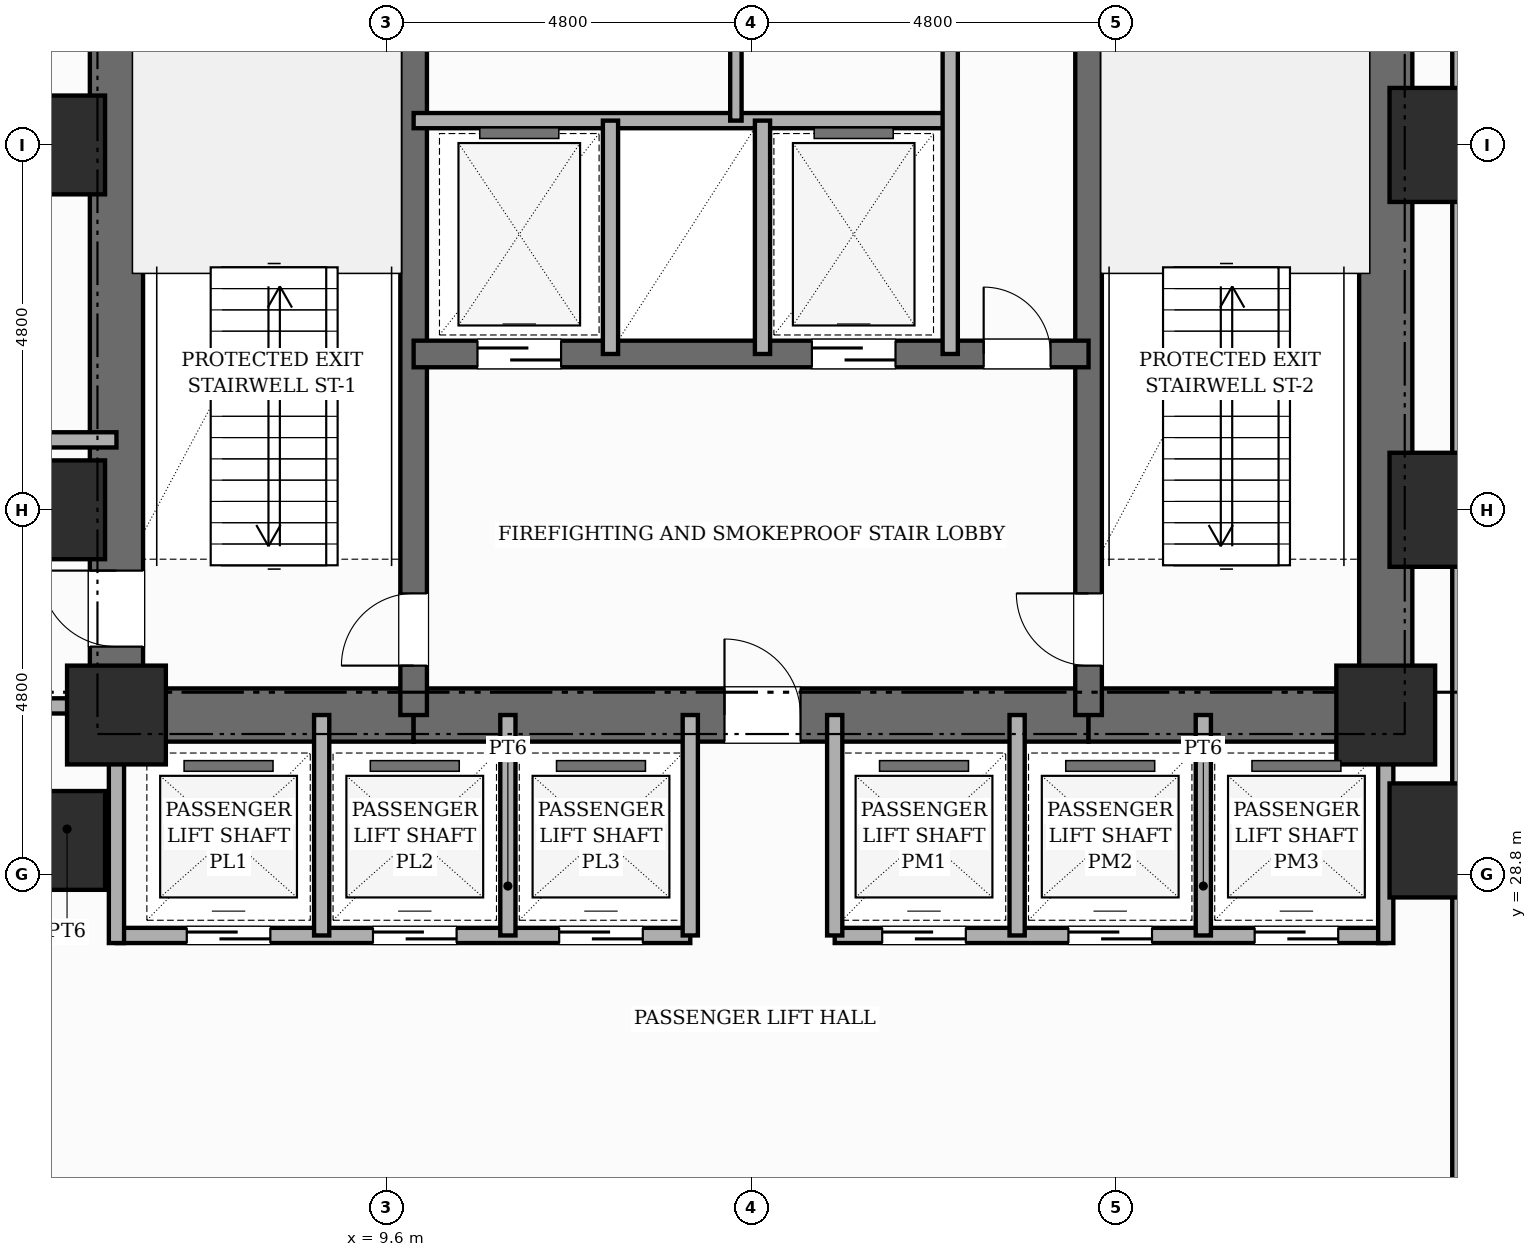
"""IFC4 building model, lengths in metres.
Left out: names, types, materials, properties, quantities, classifications, styles, units other than length and angle.
Written with IfcOpenShell. Run it as: python <this file> out.ifc"""

import sys

from ifc_helpers import new_model, si_unit, direction, frame, frame_2d, origin, origin_2d, place, context, subcontext, project, spatial, rectangle, extrude, element, fill, save


model = new_model("IFC4")
c1 = context("Model", 3, precision=1e-05, world=origin(), true_north=direction((0.0, 1.0)))
c2 = subcontext(c1, "Body", "Model", "MODEL_VIEW")
j1 = project(units=[si_unit("LENGTHUNIT", "METRE"), si_unit("PLANEANGLEUNIT", "RADIAN")], contexts=[c1])
p1 = place(None, origin())
s1 = spatial("IfcSite", under=j1, at=p1, CompositionType="ELEMENT")
p2 = place(p1, origin())
s2 = spatial("IfcBuilding", under=s1, at=p2, CompositionType="ELEMENT")
p3 = place(p2, origin())
s3 = spatial("IfcBuildingStorey", under=s2, at=p3, CompositionType="ELEMENT", Elevation=0.0)
p4 = place(p3, frame((6.05, 30.55, 0.0), z_axis=(0.0, 0.0, 1.0), x_axis=(0.0, 1.0, 0.0)))
e1 = element("IfcWall", 1, at=p4, inside=s3, PredefinedType="SHEAR", context=c2, shape_type="SweptSolid", body=[
    extrude(rectangle(XDim=15.6, YDim=0.7, at=frame_2d((7.8, 0.0))), origin(), (0.0, 0.0, 1.0), 5.2),
])
p5 = place(p4, frame((1.25, 0.0, 0.0)))
e2 = element("IfcOpeningElement", 2, at=p5, cuts=e1, PredefinedType="OPENING", context=c2, shape_type="SweptSolid", body=[
    extrude(rectangle(XDim=1.0, YDim=2.15, at=frame_2d((0.5, 1.075))), frame((0.0, 0.36, 0.0), z_axis=(0.0, -1.0, 0.0), x_axis=(1.0, 0.0, 0.0)), (0.0, 0.0, 1.0), 0.72),
])
p6 = place(p3, frame((22.75, 30.55, 0.0), z_axis=(0.0, 0.0, 1.0), x_axis=(0.0, 1.0, 0.0)))
e3 = element("IfcWall", 3, at=p6, inside=s3, PredefinedType="SHEAR", context=c2, shape_type="SweptSolid", body=[
    extrude(rectangle(XDim=15.6, YDim=0.7, at=frame_2d((7.8, 0.0))), origin(), (0.0, 0.0, 1.0), 5.2),
])
p7 = place(p6, frame((10.8, 0.0, 0.0)))
e4 = element("IfcOpeningElement", 4, at=p7, cuts=e3, PredefinedType="OPENING", context=c2, shape_type="SweptSolid", body=[
    extrude(rectangle(XDim=1.0, YDim=2.15, at=frame_2d((0.5, 1.075))), frame((0.0, 0.36, 0.0), z_axis=(0.0, -1.0, 0.0), x_axis=(1.0, 0.0, 0.0)), (0.0, 0.0, 1.0), 0.72),
])
p8 = place(p3, frame((6.05, 30.9, 0.0), z_axis=(0.0, 0.0, 1.0), x_axis=(1.0, 0.0, 0.0)))
e5 = element("IfcWall", 5, at=p8, inside=s3, PredefinedType="SHEAR", context=c2, shape_type="SweptSolid", body=[
    extrude(rectangle(XDim=3.91, YDim=0.7, at=frame_2d((1.955, 0.0))), origin(), (0.0, 0.0, 1.0), 5.2),
])
p9 = place(p3, frame((9.96, 30.9, 0.0), z_axis=(0.0, 0.0, 1.0), x_axis=(1.0, 0.0, 0.0)))
e6 = element("IfcWall", 6, at=p9, inside=s3, PredefinedType="SHEAR", context=c2, shape_type="SweptSolid", body=[
    extrude(rectangle(XDim=8.88, YDim=0.7, at=frame_2d((4.44, 0.0))), origin(), (0.0, 0.0, 1.0), 5.2),
])
p10 = place(p9, frame((4.09, 0.0, 0.0)))
e7 = element("IfcOpeningElement", 7, at=p10, cuts=e6, PredefinedType="OPENING", context=c2, shape_type="SweptSolid", body=[
    extrude(rectangle(XDim=1.0, YDim=2.15, at=frame_2d((0.5, 1.075))), frame((0.0, 0.36, 0.0), z_axis=(0.0, -1.0, 0.0), x_axis=(1.0, 0.0, 0.0)), (0.0, 0.0, 1.0), 0.72),
])
p11 = place(p3, frame((18.84, 30.9, 0.0), z_axis=(0.0, 0.0, 1.0), x_axis=(1.0, 0.0, 0.0)))
e8 = element("IfcWall", 8, at=p11, inside=s3, PredefinedType="SHEAR", context=c2, shape_type="SweptSolid", body=[
    extrude(rectangle(XDim=3.91, YDim=0.7, at=frame_2d((1.955, 0.0))), origin(), (0.0, 0.0, 1.0), 5.2),
])
p12 = place(p3, frame((9.96, 30.9, 0.0), z_axis=(0.0, 0.0, 1.0), x_axis=(0.0, 1.0, 0.0)))
e9 = element("IfcWall", 9, at=p12, inside=s3, PredefinedType="SHEAR", context=c2, shape_type="SweptSolid", body=[
    extrude(rectangle(XDim=14.9, YDim=0.35, at=frame_2d((7.45, 0.0))), origin(), (0.0, 0.0, 1.0), 5.2),
])
p13 = place(p12, frame((0.65, 0.0, 0.0)))
e10 = element("IfcOpeningElement", 10, at=p13, cuts=e9, PredefinedType="OPENING", context=c2, shape_type="SweptSolid", body=[
    extrude(rectangle(XDim=0.95, YDim=2.1, at=frame_2d((0.475, 1.05))), frame((0.0, 0.185, 0.0), z_axis=(0.0, -1.0, 0.0), x_axis=(1.0, 0.0, 0.0)), (0.0, 0.0, 1.0), 0.37),
])
p14 = place(p12, frame((10.45, 0.0, 0.0)))
e11 = element("IfcOpeningElement", 11, at=p14, cuts=e9, PredefinedType="OPENING", context=c2, shape_type="SweptSolid", body=[
    extrude(rectangle(XDim=1.0, YDim=2.15, at=frame_2d((0.5, 1.075))), frame((0.0, 0.185, 0.0), z_axis=(0.0, -1.0, 0.0), x_axis=(1.0, 0.0, 0.0)), (0.0, 0.0, 1.0), 0.37),
])
p15 = place(p3, frame((18.84, 30.9, 0.0), z_axis=(0.0, 0.0, 1.0), x_axis=(0.0, 1.0, 0.0)))
e12 = element("IfcWall", 12, at=p15, inside=s3, PredefinedType="SHEAR", context=c2, shape_type="SweptSolid", body=[
    extrude(rectangle(XDim=14.9, YDim=0.35, at=frame_2d((7.45, 0.0))), origin(), (0.0, 0.0, 1.0), 5.2),
])
p16 = place(p15, frame((0.65, 0.0, 0.0)))
e13 = element("IfcOpeningElement", 13, at=p16, cuts=e12, PredefinedType="OPENING", context=c2, shape_type="SweptSolid", body=[
    extrude(rectangle(XDim=0.95, YDim=2.1, at=frame_2d((0.475, 1.05))), frame((0.0, 0.185, 0.0), z_axis=(0.0, -1.0, 0.0), x_axis=(1.0, 0.0, 0.0)), (0.0, 0.0, 1.0), 0.37),
])
p17 = place(p15, frame((10.45, 0.0, 0.0)))
e14 = element("IfcOpeningElement", 14, at=p17, cuts=e12, PredefinedType="OPENING", context=c2, shape_type="SweptSolid", body=[
    extrude(rectangle(XDim=1.0, YDim=2.15, at=frame_2d((0.5, 1.075))), frame((0.0, 0.185, 0.0), z_axis=(0.0, -1.0, 0.0), x_axis=(1.0, 0.0, 0.0)), (0.0, 0.0, 1.0), 0.37),
])
p18 = place(p3, frame((9.96, 35.65, 0.0), z_axis=(0.0, 0.0, 1.0), x_axis=(1.0, 0.0, 0.0)))
e15 = element("IfcWall", 15, at=p18, inside=s3, PredefinedType="SHEAR", context=c2, shape_type="SweptSolid", body=[
    extrude(rectangle(XDim=8.88, YDim=0.35, at=frame_2d((4.44, 0.0))), origin(), (0.0, 0.0, 1.0), 5.2),
])
p19 = place(p18, frame((0.84, 0.0, 0.0)))
e16 = element("IfcOpeningElement", 16, at=p19, cuts=e15, PredefinedType="OPENING", context=c2, shape_type="SweptSolid", body=[
    extrude(rectangle(XDim=1.1, YDim=2.15, at=frame_2d((0.55, 1.075))), frame((0.0, 0.185, 0.0), z_axis=(0.0, -1.0, 0.0), x_axis=(1.0, 0.0, 0.0)), (0.0, 0.0, 1.0), 0.37),
])
p20 = place(p18, frame((5.24, 0.0, 0.0)))
e17 = element("IfcOpeningElement", 17, at=p20, cuts=e15, PredefinedType="OPENING", context=c2, shape_type="SweptSolid", body=[
    extrude(rectangle(XDim=1.1, YDim=2.15, at=frame_2d((0.55, 1.075))), frame((0.0, 0.185, 0.0), z_axis=(0.0, -1.0, 0.0), x_axis=(1.0, 0.0, 0.0)), (0.0, 0.0, 1.0), 0.37),
])
p21 = place(p18, frame((7.5, 0.0, 0.0)))
e18 = element("IfcOpeningElement", 18, at=p21, cuts=e15, PredefinedType="OPENING", context=c2, shape_type="SweptSolid", body=[
    extrude(rectangle(XDim=0.88, YDim=2.1, at=frame_2d((0.44, 1.05))), frame((0.0, 0.185, 0.0), z_axis=(0.0, -1.0, 0.0), x_axis=(1.0, 0.0, 0.0)), (0.0, 0.0, 1.0), 0.37),
])
for number, where, z_axis, x_axis in (
    (19, (5.25, 29.25, 0.0), (0.0, 0.0, 1.0), (1.0, 0.0, 0.0)),
    (20, (5.25, 33.6, 0.0), (0.0, 0.0, 1.0), (1.0, 0.0, 0.0)),
    (21, (5.25, 38.4, 0.0), (0.0, 0.0, 1.0), (1.0, 0.0, 0.0)),
    (22, (6.05, 30.9, 0.0), (0.0, 0.0, 1.0), (1.0, 0.0, 0.0)),
    (23, (22.75, 30.9, 0.0), (0.0, 0.0, 1.0), (1.0, 0.0, 0.0)),
):
    element("IfcColumn", number, at=place(p3, frame(where, z_axis=z_axis, x_axis=x_axis)), inside=s3, PredefinedType="COLUMN", context=c2, shape_type="SweptSolid", body=[
        extrude(rectangle(XDim=1.3, YDim=1.3, at=origin_2d()), origin(), (0.0, 0.0, 1.0), 5.2),
    ])
for number, where, z_axis, x_axis in (
    (24, (23.55, 29.25, 0.0), (0.0, 0.0, 1.0), (1.0, 0.0, 0.0)),
    (25, (23.55, 33.6, 0.0), (0.0, 0.0, 1.0), (1.0, 0.0, 0.0)),
    (26, (23.55, 38.4, 0.0), (0.0, 0.0, 1.0), (1.0, 0.0, 0.0)),
):
    element("IfcColumn", number, at=place(p3, frame(where, z_axis=z_axis, x_axis=x_axis)), inside=s3, PredefinedType="USERDEFINED", context=c2, shape_type="SweptSolid", body=[
        extrude(rectangle(XDim=1.5, YDim=1.5, at=origin_2d()), origin(), (0.0, 0.0, 1.0), 5.2),
    ])
p22 = place(p3, frame((23.825, 48.0, 0.0), z_axis=(0.0, 0.0, 1.0), x_axis=(0.0, -1.0, 0.0)))
e27 = element("IfcWall", 27, at=p22, inside=s3, PredefinedType="SOLIDWALL", context=c2, shape_type="SweptSolid", body=[
    extrude(rectangle(XDim=30.24, YDim=0.4, at=frame_2d((15.12, 0.0))), origin(), (0.0, 0.0, 1.0), 3.97),
])
p23 = place(p22, frame((25.45, 0.0, 0.85)))
e28 = element("IfcOpeningElement", 28, at=p23, cuts=e27, PredefinedType="OPENING", context=c2, shape_type="SweptSolid", body=[
    extrude(rectangle(XDim=1.9, YDim=2.6, at=frame_2d((0.95, 1.3))), frame((0.0, 0.21, 0.0), z_axis=(0.0, -1.0, 0.0), x_axis=(1.0, 0.0, 0.0)), (0.0, 0.0, 1.0), 0.42),
])
p24 = place(p3, frame((9.96, 38.72, 0.0), z_axis=(0.0, 0.0, 1.0), x_axis=(1.0, 0.0, 0.0)))
e29 = element("IfcWall", 29, at=p24, inside=s3, PredefinedType="POLYGONAL", context=c2, shape_type="SweptSolid", body=[
    extrude(rectangle(XDim=7.06, YDim=0.2, at=frame_2d((3.53, 0.0))), origin(), (0.0, 0.0, 1.0), 4.89),
])
for number, where, z_axis, x_axis in (
    (30, (12.55, 35.65, 0.0), (0.0, 0.0, 1.0), (0.0, 1.0, 0.0)),
    (31, (14.55, 35.65, 0.0), (0.0, 0.0, 1.0), (0.0, 1.0, 0.0)),
):
    element("IfcWall", number, at=place(p3, frame(where, z_axis=z_axis, x_axis=x_axis)), inside=s3, PredefinedType="POLYGONAL", context=c2, shape_type="SweptSolid", body=[
        extrude(rectangle(XDim=3.07, YDim=0.2, at=frame_2d((1.535, 0.0))), origin(), (0.0, 0.0, 1.0), 4.89),
    ])
p25 = place(p3, frame((17.02, 35.65, 0.0), z_axis=(0.0, 0.0, 1.0), x_axis=(0.0, 1.0, 0.0)))
e32 = element("IfcWall", 32, at=p25, inside=s3, PredefinedType="POLYGONAL", context=c2, shape_type="SweptSolid", body=[
    extrude(rectangle(XDim=5.15, YDim=0.2, at=frame_2d((2.575, 0.0))), origin(), (0.0, 0.0, 1.0), 4.89),
])
p26 = place(p3, frame((14.2, 38.72, 0.0), z_axis=(0.0, 0.0, 1.0), x_axis=(0.0, 1.0, 0.0)))
e33 = element("IfcWall", 33, at=p26, inside=s3, PredefinedType="PARTITIONING", context=c2, shape_type="SweptSolid", body=[
    extrude(rectangle(XDim=2.08, YDim=0.15, at=frame_2d((1.04, 0.0))), origin(), (0.0, 0.0, 1.0), 4.89),
])
p27 = place(p3, frame((6.05, 28.0, 0.0), z_axis=(0.0, 0.0, 1.0), x_axis=(1.0, 0.0, 0.0)))
e34 = element("IfcWall", 34, at=p27, inside=s3, PredefinedType="POLYGONAL", context=c2, shape_type="SweptSolid", body=[
    extrude(rectangle(XDim=7.55, YDim=0.2, at=frame_2d((3.775, 0.0))), origin(), (0.0, 0.0, 1.0), 4.89),
])
p28 = place(p27, frame((0.925, 0.0, 0.0)))
e35 = element("IfcOpeningElement", 35, at=p28, cuts=e34, PredefinedType="OPENING", context=c2, shape_type="SweptSolid", body=[
    extrude(rectangle(XDim=1.1, YDim=2.15, at=frame_2d((0.55, 1.075))), frame((0.0, 0.11, 0.0), z_axis=(0.0, -1.0, 0.0), x_axis=(1.0, 0.0, 0.0)), (0.0, 0.0, 1.0), 0.22),
])
p29 = place(p27, frame((3.375, 0.0, 0.0)))
e36 = element("IfcOpeningElement", 36, at=p29, cuts=e34, PredefinedType="OPENING", context=c2, shape_type="SweptSolid", body=[
    extrude(rectangle(XDim=1.1, YDim=2.15, at=frame_2d((0.55, 1.075))), frame((0.0, 0.11, 0.0), z_axis=(0.0, -1.0, 0.0), x_axis=(1.0, 0.0, 0.0)), (0.0, 0.0, 1.0), 0.22),
])
p30 = place(p27, frame((5.825, 0.0, 0.0)))
e37 = element("IfcOpeningElement", 37, at=p30, cuts=e34, PredefinedType="OPENING", context=c2, shape_type="SweptSolid", body=[
    extrude(rectangle(XDim=1.1, YDim=2.15, at=frame_2d((0.55, 1.075))), frame((0.0, 0.11, 0.0), z_axis=(0.0, -1.0, 0.0), x_axis=(1.0, 0.0, 0.0)), (0.0, 0.0, 1.0), 0.22),
])
p31 = place(p3, frame((15.5, 28.0, 0.0), z_axis=(0.0, 0.0, 1.0), x_axis=(1.0, 0.0, 0.0)))
e38 = element("IfcWall", 38, at=p31, inside=s3, PredefinedType="POLYGONAL", context=c2, shape_type="SweptSolid", body=[
    extrude(rectangle(XDim=7.25, YDim=0.2, at=frame_2d((3.625, 0.0))), origin(), (0.0, 0.0, 1.0), 4.89),
])
p32 = place(p31, frame((0.625, 0.0, 0.0)))
e39 = element("IfcOpeningElement", 39, at=p32, cuts=e38, PredefinedType="OPENING", context=c2, shape_type="SweptSolid", body=[
    extrude(rectangle(XDim=1.1, YDim=2.15, at=frame_2d((0.55, 1.075))), frame((0.0, 0.11, 0.0), z_axis=(0.0, -1.0, 0.0), x_axis=(1.0, 0.0, 0.0)), (0.0, 0.0, 1.0), 0.22),
])
p33 = place(p31, frame((3.075, 0.0, 0.0)))
e40 = element("IfcOpeningElement", 40, at=p33, cuts=e38, PredefinedType="OPENING", context=c2, shape_type="SweptSolid", body=[
    extrude(rectangle(XDim=1.1, YDim=2.15, at=frame_2d((0.55, 1.075))), frame((0.0, 0.11, 0.0), z_axis=(0.0, -1.0, 0.0), x_axis=(1.0, 0.0, 0.0)), (0.0, 0.0, 1.0), 0.22),
])
p34 = place(p31, frame((5.525, 0.0, 0.0)))
e41 = element("IfcOpeningElement", 41, at=p34, cuts=e38, PredefinedType="OPENING", context=c2, shape_type="SweptSolid", body=[
    extrude(rectangle(XDim=1.1, YDim=2.15, at=frame_2d((0.55, 1.075))), frame((0.0, 0.11, 0.0), z_axis=(0.0, -1.0, 0.0), x_axis=(1.0, 0.0, 0.0)), (0.0, 0.0, 1.0), 0.22),
])
for number, where, z_axis, x_axis in (
    (42, (6.05, 27.9, 0.0), (0.0, 0.0, 1.0), (0.0, 1.0, 0.0)),
    (43, (22.75, 27.9, 0.0), (0.0, 0.0, 1.0), (0.0, 1.0, 0.0)),
):
    element("IfcWall", number, at=place(p3, frame(where, z_axis=z_axis, x_axis=x_axis)), inside=s3, PredefinedType="POLYGONAL", context=c2, shape_type="SweptSolid", body=[
        extrude(rectangle(XDim=3.0, YDim=0.2, at=frame_2d((1.5, 0.0))), origin(), (0.0, 0.0, 1.0), 4.89),
    ])
for number, where, z_axis, x_axis in (
    (44, (13.6, 28.0, 0.0), (0.0, 0.0, 1.0), (0.0, 1.0, 0.0)),
    (45, (15.5, 28.0, 0.0), (0.0, 0.0, 1.0), (0.0, 1.0, 0.0)),
    (46, (8.75, 28.0, 0.0), (0.0, 0.0, 1.0), (0.0, 1.0, 0.0)),
    (47, (11.2, 28.0, 0.0), (0.0, 0.0, 1.0), (0.0, 1.0, 0.0)),
    (48, (17.9, 28.0, 0.0), (0.0, 0.0, 1.0), (0.0, 1.0, 0.0)),
    (49, (20.35, 28.0, 0.0), (0.0, 0.0, 1.0), (0.0, 1.0, 0.0)),
):
    element("IfcWall", number, at=place(p3, frame(where, z_axis=z_axis, x_axis=x_axis)), inside=s3, PredefinedType="POLYGONAL", context=c2, shape_type="SweptSolid", body=[
        extrude(rectangle(XDim=2.9, YDim=0.2, at=frame_2d((1.45, 0.0))), origin(), (0.0, 0.0, 1.0), 4.89),
    ])
p35 = place(p3, frame((0.36, 34.52, 0.0), z_axis=(0.0, 0.0, 1.0), x_axis=(1.0, 0.0, 0.0)))
e50 = element("IfcWall", 50, at=p35, inside=s3, PredefinedType="PARTITIONING", context=c2, shape_type="SweptSolid", body=[
    extrude(rectangle(XDim=5.69, YDim=0.2, at=frame_2d((2.845, 0.0))), origin(), (0.0, 0.0, 1.0), 4.89),
])
p36 = place(p35, frame((2.02, 0.0, 0.0)))
e51 = element("IfcOpeningElement", 51, at=p36, cuts=e50, PredefinedType="OPENING", context=c2, shape_type="SweptSolid", body=[
    extrude(rectangle(XDim=0.98, YDim=2.18, at=frame_2d((0.49, 1.09))), frame((0.0, 0.11, 0.0), z_axis=(0.0, -1.0, 0.0), x_axis=(1.0, 0.0, 0.0)), (0.0, 0.0, 1.0), 0.22),
])
p37 = place(p3, frame((0.36, 31.02, 0.0), z_axis=(0.0, 0.0, 1.0), x_axis=(1.0, 0.0, 0.0)))
e52 = element("IfcWall", 52, at=p37, inside=s3, PredefinedType="PARTITIONING", context=c2, shape_type="SweptSolid", body=[
    extrude(rectangle(XDim=5.69, YDim=0.2, at=frame_2d((2.845, 0.0))), origin(), (0.0, 0.0, 1.0), 4.89),
])
p38 = place(p13, origin())
e53 = element("IfcDoor", 53, at=p38, inside=s3, OperationType="SINGLE_SWING_LEFT", PredefinedType="DOOR", context=c2, shape_type="SweptSolid", body=[
    extrude(rectangle(XDim=0.95, YDim=2.1, at=frame_2d((0.475, 1.05))), frame((0.0, 0.025, 0.0), z_axis=(0.0, -1.0, 0.0), x_axis=(1.0, 0.0, 0.0)), (0.0, 0.0, 1.0), 0.05),
])
fill(e10, e53)
p39 = place(p16, origin())
e54 = element("IfcDoor", 54, at=p39, inside=s3, OperationType="SINGLE_SWING_RIGHT", PredefinedType="DOOR", context=c2, shape_type="SweptSolid", body=[
    extrude(rectangle(XDim=0.95, YDim=2.1, at=frame_2d((0.475, 1.05))), frame((0.0, 0.025, 0.0), z_axis=(0.0, -1.0, 0.0), x_axis=(1.0, 0.0, 0.0)), (0.0, 0.0, 1.0), 0.05),
])
fill(e13, e54)
p40 = place(p5, origin())
e55 = element("IfcDoor", 55, at=p40, inside=s3, OperationType="SINGLE_SWING_RIGHT", PredefinedType="DOOR", context=c2, shape_type="SweptSolid", body=[
    extrude(rectangle(XDim=1.0, YDim=2.15, at=frame_2d((0.5, 1.075))), frame((0.0, 0.025, 0.0), z_axis=(0.0, -1.0, 0.0), x_axis=(1.0, 0.0, 0.0)), (0.0, 0.0, 1.0), 0.05),
])
fill(e2, e55)
p41 = place(p10, origin())
e56 = element("IfcDoor", 56, at=p41, inside=s3, OperationType="SINGLE_SWING_LEFT", PredefinedType="DOOR", context=c2, shape_type="SweptSolid", body=[
    extrude(rectangle(XDim=1.0, YDim=2.15, at=frame_2d((0.5, 1.075))), frame((0.0, 0.025, 0.0), z_axis=(0.0, -1.0, 0.0), x_axis=(1.0, 0.0, 0.0)), (0.0, 0.0, 1.0), 0.05),
])
fill(e7, e56)
p42 = place(p19, origin())
e57 = element("IfcDoor", 57, at=p42, inside=s3, OperationType="SLIDING_TO_LEFT", PredefinedType="DOOR", context=c2, shape_type="SweptSolid", body=[
    extrude(rectangle(XDim=1.1, YDim=2.15, at=frame_2d((0.55, 1.075))), frame((0.0, 0.025, 0.0), z_axis=(0.0, -1.0, 0.0), x_axis=(1.0, 0.0, 0.0)), (0.0, 0.0, 1.0), 0.05),
])
fill(e16, e57)
p43 = place(p20, origin())
e58 = element("IfcDoor", 58, at=p43, inside=s3, OperationType="SLIDING_TO_RIGHT", PredefinedType="DOOR", context=c2, shape_type="SweptSolid", body=[
    extrude(rectangle(XDim=1.1, YDim=2.15, at=frame_2d((0.55, 1.075))), frame((0.0, 0.025, 0.0), z_axis=(0.0, -1.0, 0.0), x_axis=(1.0, 0.0, 0.0)), (0.0, 0.0, 1.0), 0.05),
])
fill(e17, e58)
p44 = place(p21, origin())
e59 = element("IfcDoor", 59, at=p44, inside=s3, OperationType="SINGLE_SWING_LEFT", PredefinedType="DOOR", context=c2, shape_type="SweptSolid", body=[
    extrude(rectangle(XDim=0.88, YDim=2.1, at=frame_2d((0.44, 1.05))), frame((0.0, 0.025, 0.0), z_axis=(0.0, -1.0, 0.0), x_axis=(1.0, 0.0, 0.0)), (0.0, 0.0, 1.0), 0.05),
])
fill(e18, e59)
p45 = place(p28, origin())
e60 = element("IfcDoor", 60, at=p45, inside=s3, OperationType="SLIDING_TO_LEFT", PredefinedType="DOOR", context=c2, shape_type="SweptSolid", body=[
    extrude(rectangle(XDim=1.1, YDim=2.15, at=frame_2d((0.55, 1.075))), frame((0.0, 0.025, 0.0), z_axis=(0.0, -1.0, 0.0), x_axis=(1.0, 0.0, 0.0)), (0.0, 0.0, 1.0), 0.05),
])
fill(e35, e60)
p46 = place(p29, origin())
e61 = element("IfcDoor", 61, at=p46, inside=s3, OperationType="SLIDING_TO_RIGHT", PredefinedType="DOOR", context=c2, shape_type="SweptSolid", body=[
    extrude(rectangle(XDim=1.1, YDim=2.15, at=frame_2d((0.55, 1.075))), frame((0.0, 0.025, 0.0), z_axis=(0.0, -1.0, 0.0), x_axis=(1.0, 0.0, 0.0)), (0.0, 0.0, 1.0), 0.05),
])
fill(e36, e61)
p47 = place(p30, origin())
e62 = element("IfcDoor", 62, at=p47, inside=s3, OperationType="SLIDING_TO_LEFT", PredefinedType="DOOR", context=c2, shape_type="SweptSolid", body=[
    extrude(rectangle(XDim=1.1, YDim=2.15, at=frame_2d((0.55, 1.075))), frame((0.0, 0.025, 0.0), z_axis=(0.0, -1.0, 0.0), x_axis=(1.0, 0.0, 0.0)), (0.0, 0.0, 1.0), 0.05),
])
fill(e37, e62)
p48 = place(p32, origin())
e63 = element("IfcDoor", 63, at=p48, inside=s3, OperationType="SLIDING_TO_RIGHT", PredefinedType="DOOR", context=c2, shape_type="SweptSolid", body=[
    extrude(rectangle(XDim=1.1, YDim=2.15, at=frame_2d((0.55, 1.075))), frame((0.0, 0.025, 0.0), z_axis=(0.0, -1.0, 0.0), x_axis=(1.0, 0.0, 0.0)), (0.0, 0.0, 1.0), 0.05),
])
fill(e39, e63)
p49 = place(p33, origin())
e64 = element("IfcDoor", 64, at=p49, inside=s3, OperationType="SLIDING_TO_LEFT", PredefinedType="DOOR", context=c2, shape_type="SweptSolid", body=[
    extrude(rectangle(XDim=1.1, YDim=2.15, at=frame_2d((0.55, 1.075))), frame((0.0, 0.025, 0.0), z_axis=(0.0, -1.0, 0.0), x_axis=(1.0, 0.0, 0.0)), (0.0, 0.0, 1.0), 0.05),
])
fill(e40, e64)
p50 = place(p34, origin())
e65 = element("IfcDoor", 65, at=p50, inside=s3, OperationType="SLIDING_TO_RIGHT", PredefinedType="DOOR", context=c2, shape_type="SweptSolid", body=[
    extrude(rectangle(XDim=1.1, YDim=2.15, at=frame_2d((0.55, 1.075))), frame((0.0, 0.025, 0.0), z_axis=(0.0, -1.0, 0.0), x_axis=(1.0, 0.0, 0.0)), (0.0, 0.0, 1.0), 0.05),
])
fill(e41, e65)
save(model, sys.argv[1])
